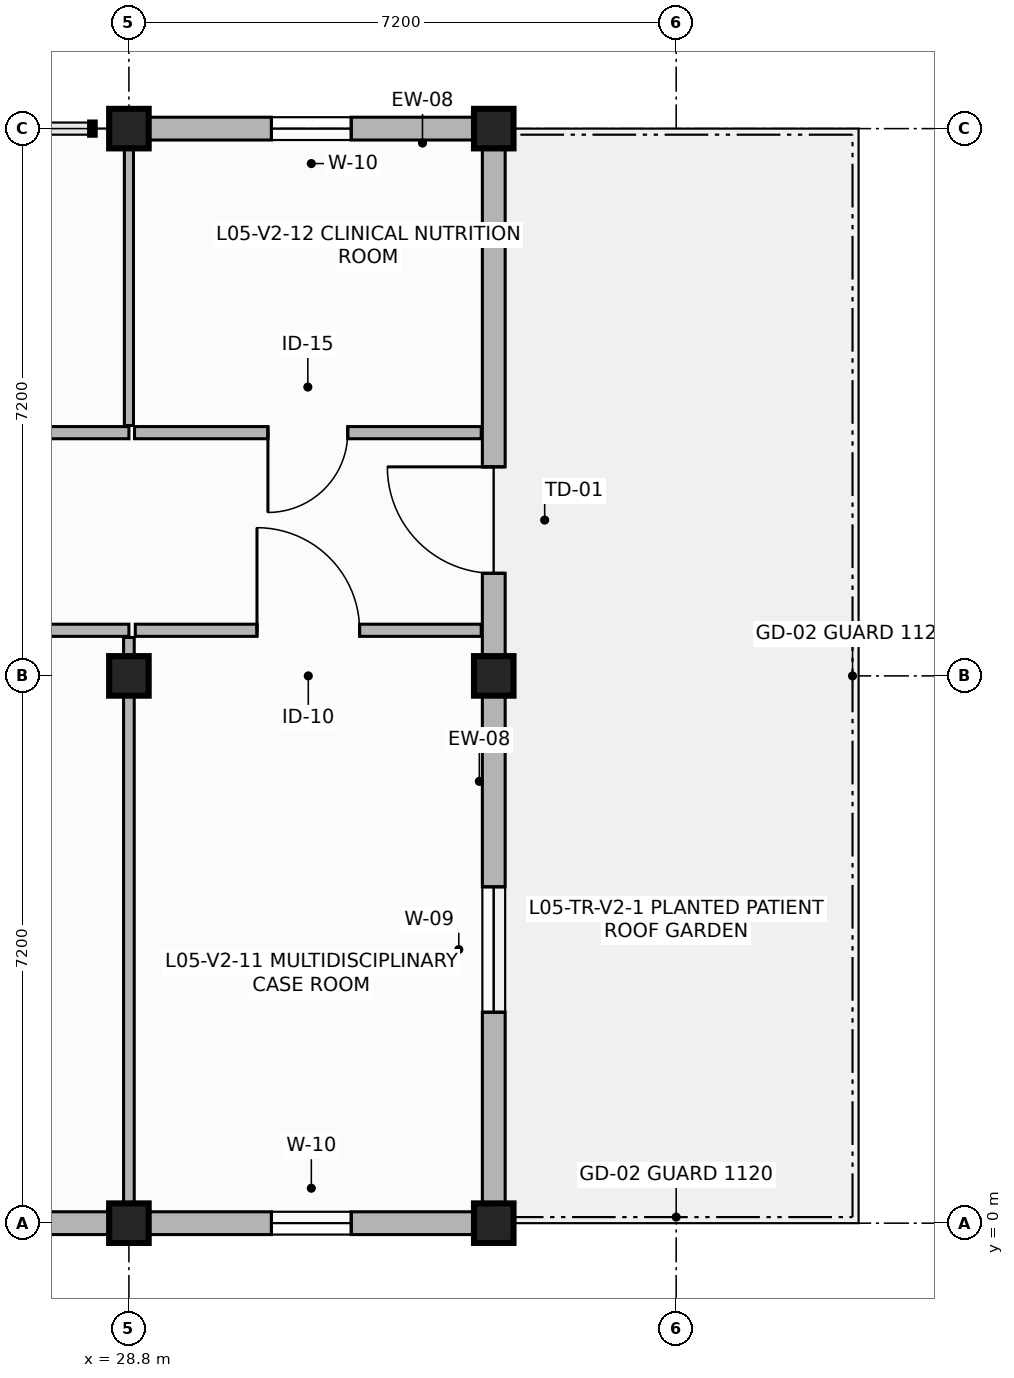
"""IFC4 building model, lengths in metres.
Left out: names, types, materials, properties, quantities, classifications, styles, units other than length and angle.
Written with IfcOpenShell. Run it as: python <this file> out.ifc"""

import sys

from ifc_helpers import new_model, si_unit, direction, frame, frame_2d, origin, origin_2d, place, context, subcontext, project, spatial, rectangle, extrude, element, fill, save


model = new_model("IFC4")
c1 = context("Model", 3, precision=1e-05, world=origin(), true_north=direction((0.0, 1.0)))
c2 = subcontext(c1, "Body", "Model", "MODEL_VIEW")
j1 = project(units=[si_unit("LENGTHUNIT", "METRE"), si_unit("PLANEANGLEUNIT", "RADIAN")], contexts=[c1])
p1 = place(None, origin())
s1 = spatial("IfcSite", under=j1, at=p1, CompositionType="ELEMENT")
p2 = place(p1, origin())
s2 = spatial("IfcBuilding", under=s1, at=p2, CompositionType="ELEMENT")
p3 = place(p2, frame((0.0, 0.0, 19.7)))
s3 = spatial("IfcBuildingStorey", under=s2, at=p3, CompositionType="ELEMENT", Elevation=19.7)
for number, where, z_axis, x_axis in (
    (1, (28.8, 0.0, 0.0), (0.0, 0.0, 1.0), (1.0, 0.0, 0.0)),
    (2, (28.8, 7.2, 0.0), (0.0, 0.0, 1.0), (1.0, 0.0, 0.0)),
    (3, (28.8, 14.4, 0.0), (0.0, 0.0, 1.0), (1.0, 0.0, 0.0)),
    (4, (33.6, 0.0, 0.0), (0.0, 0.0, 1.0), (1.0, 0.0, 0.0)),
    (5, (33.6, 7.2, 0.0), (0.0, 0.0, 1.0), (1.0, 0.0, 0.0)),
    (6, (33.6, 14.4, 0.0), (0.0, 0.0, 1.0), (1.0, 0.0, 0.0)),
):
    element("IfcColumn", number, at=place(p3, frame(where, z_axis=z_axis, x_axis=x_axis)), inside=s3, PredefinedType="COLUMN", context=c2, shape_type="SweptSolid", body=[
        extrude(rectangle(XDim=0.52, YDim=0.52, at=origin_2d()), origin(), (0.0, 0.0, 1.0), 3.42),
    ])
p4 = place(p3, frame((21.6, 0.0, 0.0), z_axis=(0.0, 0.0, 1.0), x_axis=(1.0, 0.0, 0.0)))
e7 = element("IfcWall", 7, at=p4, inside=s3, PredefinedType="SOLIDWALL", context=c2, shape_type="SweptSolid", body=[
    extrude(rectangle(XDim=7.2, YDim=0.3, at=frame_2d((3.6, 0.0))), origin(), (0.0, 0.0, 1.0), 2.8),
])
p5 = place(p4, frame((2.875, 0.0, 0.85)))
e8 = element("IfcOpeningElement", 8, at=p5, cuts=e7, PredefinedType="OPENING", context=c2, shape_type="SweptSolid", body=[
    extrude(rectangle(XDim=1.45, YDim=1.75, at=frame_2d((0.725, 0.875))), frame((0.0, 0.16, 0.0), z_axis=(0.0, -1.0, 0.0), x_axis=(1.0, 0.0, 0.0)), (0.0, 0.0, 1.0), 0.32),
])
p6 = place(p3, frame((28.8, 0.0, 0.0), z_axis=(0.0, 0.0, 1.0), x_axis=(1.0, 0.0, 0.0)))
e9 = element("IfcWall", 9, at=p6, inside=s3, PredefinedType="SOLIDWALL", context=c2, shape_type="SweptSolid", body=[
    extrude(rectangle(XDim=4.8, YDim=0.3, at=frame_2d((2.4, 0.0))), origin(), (0.0, 0.0, 1.0), 2.8),
])
p7 = place(p6, frame((1.875, 0.0, 0.85)))
e10 = element("IfcOpeningElement", 10, at=p7, cuts=e9, PredefinedType="OPENING", context=c2, shape_type="SweptSolid", body=[
    extrude(rectangle(XDim=1.05, YDim=1.7, at=frame_2d((0.525, 0.85))), frame((0.0, 0.16, 0.0), z_axis=(0.0, -1.0, 0.0), x_axis=(1.0, 0.0, 0.0)), (0.0, 0.0, 1.0), 0.32),
])
p8 = place(p3, frame((33.6, 0.0, 0.0), z_axis=(0.0, 0.0, 1.0), x_axis=(0.0, 1.0, 0.0)))
e11 = element("IfcWall", 11, at=p8, inside=s3, PredefinedType="SOLIDWALL", context=c2, shape_type="SweptSolid", body=[
    extrude(rectangle(XDim=7.2, YDim=0.3, at=frame_2d((3.6, 0.0))), origin(), (0.0, 0.0, 1.0), 2.8),
])
p9 = place(p8, frame((2.775, 0.0, 0.85)))
e12 = element("IfcOpeningElement", 12, at=p9, cuts=e11, PredefinedType="OPENING", context=c2, shape_type="SweptSolid", body=[
    extrude(rectangle(XDim=1.65, YDim=1.75, at=frame_2d((0.825, 0.875))), frame((0.0, 0.16, 0.0), z_axis=(0.0, -1.0, 0.0), x_axis=(1.0, 0.0, 0.0)), (0.0, 0.0, 1.0), 0.32),
])
p10 = place(p3, frame((33.6, 7.2, 0.0), z_axis=(0.0, 0.0, 1.0), x_axis=(0.0, 1.0, 0.0)))
e13 = element("IfcWall", 13, at=p10, inside=s3, PredefinedType="SOLIDWALL", context=c2, shape_type="SweptSolid", body=[
    extrude(rectangle(XDim=7.2, YDim=0.3, at=frame_2d((3.6, 0.0))), origin(), (0.0, 0.0, 1.0), 2.8),
])
p11 = place(p10, frame((1.35, 0.0, 0.0)))
e14 = element("IfcOpeningElement", 14, at=p11, cuts=e13, PredefinedType="OPENING", context=c2, shape_type="SweptSolid", body=[
    extrude(rectangle(XDim=1.4, YDim=2.25, at=frame_2d((0.7, 1.125))), frame((0.0, 0.16, 0.0), z_axis=(0.0, -1.0, 0.0), x_axis=(1.0, 0.0, 0.0)), (0.0, 0.0, 1.0), 0.32),
])
p12 = place(p3, frame((33.6, 14.4, 0.0), z_axis=(0.0, 0.0, 1.0), x_axis=(-1.0, 0.0, 0.0)))
e15 = element("IfcWall", 15, at=p12, inside=s3, PredefinedType="SOLIDWALL", context=c2, shape_type="SweptSolid", body=[
    extrude(rectangle(XDim=4.8, YDim=0.3, at=frame_2d((2.4, 0.0))), origin(), (0.0, 0.0, 1.0), 2.8),
])
p13 = place(p12, frame((1.875, 0.0, 0.85)))
e16 = element("IfcOpeningElement", 16, at=p13, cuts=e15, PredefinedType="OPENING", context=c2, shape_type="SweptSolid", body=[
    extrude(rectangle(XDim=1.05, YDim=1.7, at=frame_2d((0.525, 0.85))), frame((0.0, 0.16, 0.0), z_axis=(0.0, -1.0, 0.0), x_axis=(1.0, 0.0, 0.0)), (0.0, 0.0, 1.0), 0.32),
])
p14 = place(p3, frame((21.679, 7.8, 0.0), z_axis=(0.0, 0.0, 1.0), x_axis=(1.0, 0.0, 0.0)))
e17 = element("IfcWall", 17, at=p14, inside=s3, PredefinedType="PARTITIONING", context=c2, shape_type="SweptSolid", body=[
    extrude(rectangle(XDim=7.121, YDim=0.16, at=frame_2d((3.561, 0.0))), origin(), (0.0, 0.0, 1.0), 2.78),
])
p15 = place(p14, frame((3.036, 0.0, 0.0)))
e18 = element("IfcOpeningElement", 18, at=p15, cuts=e17, PredefinedType="OPENING", context=c2, shape_type="SweptSolid", body=[
    extrude(rectangle(XDim=1.05, YDim=2.15, at=frame_2d((0.525, 1.075))), frame((0.0, 0.09, 0.0), z_axis=(0.0, -1.0, 0.0), x_axis=(1.0, 0.0, 0.0)), (0.0, 0.0, 1.0), 0.18),
])
p16 = place(p3, frame((28.8, 7.706, 0.0), z_axis=(0.0, 0.0, 1.0), x_axis=(0.0, -1.0, 0.0)))
e19 = element("IfcWall", 19, at=p16, inside=s3, PredefinedType="PARTITIONING", context=c2, shape_type="SweptSolid", body=[
    extrude(rectangle(XDim=7.541, YDim=0.14, at=frame_2d((3.771, 0.0))), origin(), (0.0, 0.0, 1.0), 2.78),
])
p17 = place(p3, frame((28.8, 10.4, 0.0), z_axis=(0.0, 0.0, 1.0), x_axis=(-1.0, 0.0, 0.0)))
e20 = element("IfcWall", 20, at=p17, inside=s3, PredefinedType="PARTITIONING", context=c2, shape_type="SweptSolid", body=[
    extrude(rectangle(XDim=7.116, YDim=0.16, at=frame_2d((3.558, 0.0))), origin(), (0.0, 0.0, 1.0), 2.78),
])
p18 = place(p17, frame((3.033, 0.0, 0.0)))
e21 = element("IfcOpeningElement", 21, at=p18, cuts=e20, PredefinedType="OPENING", context=c2, shape_type="SweptSolid", body=[
    extrude(rectangle(XDim=1.05, YDim=2.2, at=frame_2d((0.525, 1.1))), frame((0.0, 0.09, 0.0), z_axis=(0.0, -1.0, 0.0), x_axis=(1.0, 0.0, 0.0)), (0.0, 0.0, 1.0), 0.18),
])
p19 = place(p3, frame((28.8, 14.235, 0.0), z_axis=(0.0, 0.0, 1.0), x_axis=(0.0, -1.0, 0.0)))
e22 = element("IfcWall", 22, at=p19, inside=s3, PredefinedType="PARTITIONING", context=c2, shape_type="SweptSolid", body=[
    extrude(rectangle(XDim=3.741, YDim=0.12, at=frame_2d((1.871, 0.0))), origin(), (0.0, 0.0, 1.0), 2.78),
])
p20 = place(p3, frame((28.884, 7.8, 0.0), z_axis=(0.0, 0.0, 1.0), x_axis=(1.0, 0.0, 0.0)))
e23 = element("IfcWall", 23, at=p20, inside=s3, PredefinedType="PARTITIONING", context=c2, shape_type="SweptSolid", body=[
    extrude(rectangle(XDim=4.551, YDim=0.16, at=frame_2d((2.275, 0.0))), origin(), (0.0, 0.0, 1.0), 2.78),
])
p21 = place(p20, frame((1.601, 0.0, 0.0)))
e24 = element("IfcOpeningElement", 24, at=p21, cuts=e23, PredefinedType="OPENING", context=c2, shape_type="SweptSolid", body=[
    extrude(rectangle(XDim=1.35, YDim=2.25, at=frame_2d((0.675, 1.125))), frame((0.0, 0.09, 0.0), z_axis=(0.0, -1.0, 0.0), x_axis=(1.0, 0.0, 0.0)), (0.0, 0.0, 1.0), 0.18),
])
p22 = place(p3, frame((33.435, 10.4, 0.0), z_axis=(0.0, 0.0, 1.0), x_axis=(-1.0, 0.0, 0.0)))
e25 = element("IfcWall", 25, at=p22, inside=s3, PredefinedType="PARTITIONING", context=c2, shape_type="SweptSolid", body=[
    extrude(rectangle(XDim=4.561, YDim=0.16, at=frame_2d((2.281, 0.0))), origin(), (0.0, 0.0, 1.0), 2.78),
])
p23 = place(p22, frame((1.756, 0.0, 0.0)))
e26 = element("IfcOpeningElement", 26, at=p23, cuts=e25, PredefinedType="OPENING", context=c2, shape_type="SweptSolid", body=[
    extrude(rectangle(XDim=1.05, YDim=2.2, at=frame_2d((0.525, 1.1))), frame((0.0, 0.09, 0.0), z_axis=(0.0, -1.0, 0.0), x_axis=(1.0, 0.0, 0.0)), (0.0, 0.0, 1.0), 0.18),
])
p24 = place(p7, origin())
e27 = element("IfcWindow", 27, at=p24, inside=s3, PartitioningType="SINGLE_PANEL", PredefinedType="WINDOW", context=c2, shape_type="SweptSolid", body=[
    extrude(rectangle(XDim=1.05, YDim=1.7, at=frame_2d((0.525, 0.85))), frame((0.0, 0.03, 0.0), z_axis=(0.0, -1.0, 0.0), x_axis=(1.0, 0.0, 0.0)), (0.0, 0.0, 1.0), 0.06),
])
fill(e10, e27)
p25 = place(p9, origin())
e28 = element("IfcWindow", 28, at=p25, inside=s3, PartitioningType="SINGLE_PANEL", PredefinedType="WINDOW", context=c2, shape_type="SweptSolid", body=[
    extrude(rectangle(XDim=1.65, YDim=1.75, at=frame_2d((0.825, 0.875))), frame((0.0, 0.03, 0.0), z_axis=(0.0, -1.0, 0.0), x_axis=(1.0, 0.0, 0.0)), (0.0, 0.0, 1.0), 0.06),
])
fill(e12, e28)
p26 = place(p11, origin())
e29 = element("IfcDoor", 29, at=p26, inside=s3, OperationType="SINGLE_SWING_RIGHT", PredefinedType="DOOR", context=c2, shape_type="SweptSolid", body=[
    extrude(rectangle(XDim=1.4, YDim=2.25, at=frame_2d((0.7, 1.125))), frame((0.0, 0.025, 0.0), z_axis=(0.0, -1.0, 0.0), x_axis=(1.0, 0.0, 0.0)), (0.0, 0.0, 1.0), 0.05),
])
fill(e14, e29)
p27 = place(p13, origin())
e30 = element("IfcWindow", 30, at=p27, inside=s3, PartitioningType="SINGLE_PANEL", PredefinedType="WINDOW", context=c2, shape_type="SweptSolid", body=[
    extrude(rectangle(XDim=1.05, YDim=1.7, at=frame_2d((0.525, 0.85))), frame((0.0, 0.03, 0.0), z_axis=(0.0, -1.0, 0.0), x_axis=(1.0, 0.0, 0.0)), (0.0, 0.0, 1.0), 0.06),
])
fill(e16, e30)
p28 = place(p21, origin())
e31 = element("IfcDoor", 31, at=p28, inside=s3, OperationType="SINGLE_SWING_LEFT", PredefinedType="DOOR", context=c2, shape_type="SweptSolid", body=[
    extrude(rectangle(XDim=1.35, YDim=2.25, at=frame_2d((0.675, 1.125))), frame((0.0, 0.025, 0.0), z_axis=(0.0, -1.0, 0.0), x_axis=(1.0, 0.0, 0.0)), (0.0, 0.0, 1.0), 0.05),
])
fill(e24, e31)
p29 = place(p23, origin())
e32 = element("IfcDoor", 32, at=p29, inside=s3, OperationType="SINGLE_SWING_RIGHT", PredefinedType="DOOR", context=c2, shape_type="SweptSolid", body=[
    extrude(rectangle(XDim=1.05, YDim=2.2, at=frame_2d((0.525, 1.1))), frame((0.0, 0.025, 0.0), z_axis=(0.0, -1.0, 0.0), x_axis=(1.0, 0.0, 0.0)), (0.0, 0.0, 1.0), 0.05),
])
fill(e26, e32)
save(model, sys.argv[1])
